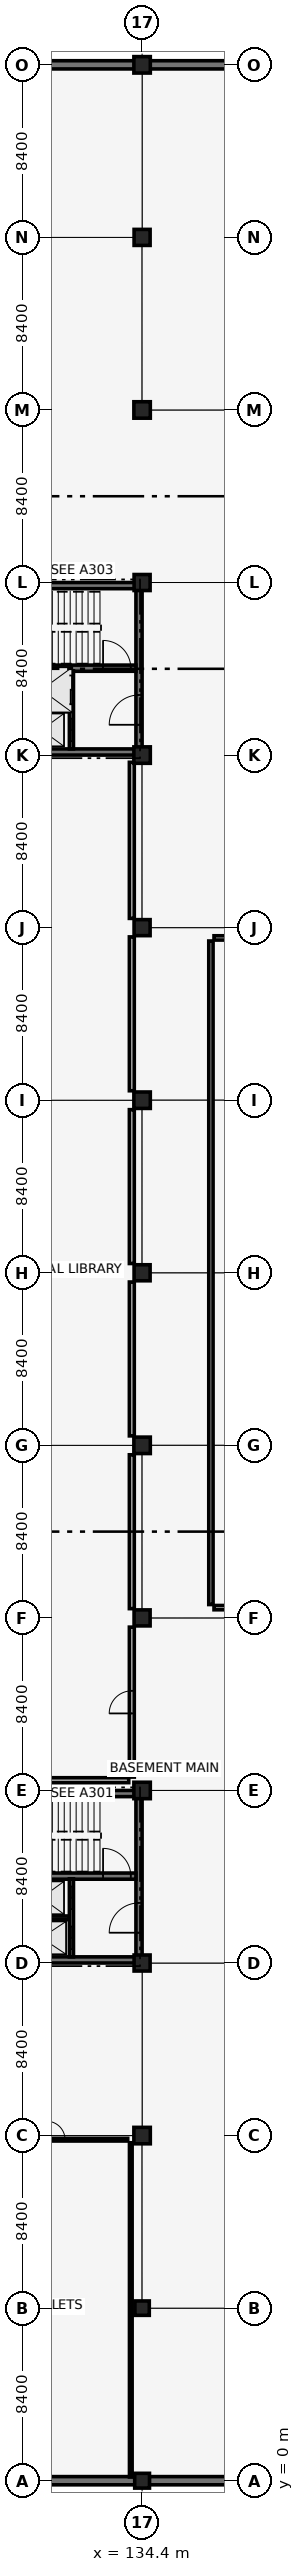
"""IFC4 building model, lengths in metres.
Left out: names, types, materials, properties, quantities, classifications, styles, units other than length and angle.
Written with IfcOpenShell. Run it as: python <this file> out.ifc"""

import sys

from ifc_helpers import new_model, si_unit, direction, frame, frame_2d, origin, origin_2d, place, context, subcontext, project, spatial, rectangle, extrude, element, fill, save


model = new_model("IFC4")
c1 = context("Model", 3, precision=1e-05, world=origin(), true_north=direction((0.0, 1.0)))
c2 = subcontext(c1, "Body", "Model", "MODEL_VIEW")
j1 = project(units=[si_unit("LENGTHUNIT", "METRE"), si_unit("PLANEANGLEUNIT", "RADIAN")], contexts=[c1])
p1 = place(None, origin())
s1 = spatial("IfcSite", under=j1, at=p1, CompositionType="ELEMENT")
p2 = place(p1, origin())
s2 = spatial("IfcBuilding", under=s1, at=p2, CompositionType="ELEMENT")
p3 = place(p2, frame((0.0, 0.0, -4.42)))
s3 = spatial("IfcBuildingStorey", under=s2, at=p3, CompositionType="ELEMENT", Elevation=-4.42)
for number, where, z_axis, x_axis in (
    (1, (126.35, 0.0, 0.0), (0.0, 0.0, 1.0), (1.0, 0.0, 0.0)),
    (2, (126.35, 117.6, 0.0), (0.0, 0.0, 1.0), (1.0, 0.0, 0.0)),
    (3, (134.75, 0.0, 0.0), (0.0, 0.0, 1.0), (1.0, 0.0, 0.0)),
    (4, (134.75, 117.6, 0.0), (0.0, 0.0, 1.0), (1.0, 0.0, 0.0)),
):
    element("IfcWall", number, at=place(p3, frame(where, z_axis=z_axis, x_axis=x_axis)), inside=s3, PredefinedType="USERDEFINED", context=c2, shape_type="SweptSolid", body=[
        extrude(rectangle(XDim=7.7, YDim=0.4, at=frame_2d((3.85, 0.0))), origin(), (0.0, 0.0, 1.0), 4.12),
    ])
p4 = place(p3, frame((126.15, 25.35, 0.0), z_axis=(0.0, 0.0, 1.0), x_axis=(1.0, 0.0, 0.0)))
e5 = element("IfcWall", 5, at=p4, inside=s3, PredefinedType="SHEAR", context=c2, shape_type="SweptSolid", body=[
    extrude(rectangle(XDim=8.1, YDim=0.3, at=frame_2d((4.05, 0.0))), origin(), (0.0, 0.0, 1.0), 4.12),
])
p5 = place(p4, frame((0.485, 0.0, 0.0)))
e6 = element("IfcOpeningElement", 6, at=p5, cuts=e5, PredefinedType="OPENING", context=c2, shape_type="SweptSolid", body=[
    extrude(rectangle(XDim=1.0, YDim=2.15, at=frame_2d((0.5, 1.075))), frame((0.0, 0.16, 0.0), z_axis=(0.0, -1.0, 0.0), x_axis=(1.0, 0.0, 0.0)), (0.0, 0.0, 1.0), 0.32),
])
p6 = place(p3, frame((126.15, 33.45, 0.0), z_axis=(0.0, 0.0, 1.0), x_axis=(1.0, 0.0, 0.0)))
e7 = element("IfcWall", 7, at=p6, inside=s3, PredefinedType="SHEAR", context=c2, shape_type="SweptSolid", body=[
    extrude(rectangle(XDim=8.1, YDim=0.3, at=frame_2d((4.05, 0.0))), origin(), (0.0, 0.0, 1.0), 4.12),
])
p7 = place(p3, frame((134.25, 25.35, 0.0), z_axis=(0.0, 0.0, 1.0), x_axis=(0.0, 1.0, 0.0)))
e8 = element("IfcWall", 8, at=p7, inside=s3, PredefinedType="SHEAR", context=c2, shape_type="SweptSolid", body=[
    extrude(rectangle(XDim=8.1, YDim=0.3, at=frame_2d((4.05, 0.0))), origin(), (0.0, 0.0, 1.0), 4.12),
])
p8 = place(p7, frame((1.325, 0.0, 0.0)))
e9 = element("IfcOpeningElement", 9, at=p8, cuts=e8, PredefinedType="OPENING", context=c2, shape_type="SweptSolid", body=[
    extrude(rectangle(XDim=1.45, YDim=2.15, at=frame_2d((0.725, 1.075))), frame((0.0, 0.16, 0.0), z_axis=(0.0, -1.0, 0.0), x_axis=(1.0, 0.0, 0.0)), (0.0, 0.0, 1.0), 0.32),
])
p9 = place(p3, frame((126.3, 29.43, 0.0), z_axis=(0.0, 0.0, 1.0), x_axis=(1.0, 0.0, 0.0)))
e10 = element("IfcWall", 10, at=p9, inside=s3, PredefinedType="SHEAR", context=c2, shape_type="SweptSolid", body=[
    extrude(rectangle(XDim=7.8, YDim=0.3, at=frame_2d((3.9, 0.0))), origin(), (0.0, 0.0, 1.0), 4.12),
])
p10 = place(p9, frame((6.2, 0.0, 0.0)))
e11 = element("IfcOpeningElement", 11, at=p10, cuts=e10, PredefinedType="OPENING", context=c2, shape_type="SweptSolid", body=[
    extrude(rectangle(XDim=1.35, YDim=2.15, at=frame_2d((0.675, 1.075))), frame((0.0, 0.16, 0.0), z_axis=(0.0, -1.0, 0.0), x_axis=(1.0, 0.0, 0.0)), (0.0, 0.0, 1.0), 0.32),
])
p11 = place(p3, frame((126.15, 84.15, 0.0), z_axis=(0.0, 0.0, 1.0), x_axis=(1.0, 0.0, 0.0)))
e12 = element("IfcWall", 12, at=p11, inside=s3, PredefinedType="SHEAR", context=c2, shape_type="SweptSolid", body=[
    extrude(rectangle(XDim=8.1, YDim=0.3, at=frame_2d((4.05, 0.0))), origin(), (0.0, 0.0, 1.0), 4.12),
])
p12 = place(p11, frame((0.485, 0.0, 0.0)))
e13 = element("IfcOpeningElement", 13, at=p12, cuts=e12, PredefinedType="OPENING", context=c2, shape_type="SweptSolid", body=[
    extrude(rectangle(XDim=1.0, YDim=2.15, at=frame_2d((0.5, 1.075))), frame((0.0, 0.16, 0.0), z_axis=(0.0, -1.0, 0.0), x_axis=(1.0, 0.0, 0.0)), (0.0, 0.0, 1.0), 0.32),
])
p13 = place(p3, frame((126.15, 92.25, 0.0), z_axis=(0.0, 0.0, 1.0), x_axis=(1.0, 0.0, 0.0)))
e14 = element("IfcWall", 14, at=p13, inside=s3, PredefinedType="SHEAR", context=c2, shape_type="SweptSolid", body=[
    extrude(rectangle(XDim=8.1, YDim=0.3, at=frame_2d((4.05, 0.0))), origin(), (0.0, 0.0, 1.0), 4.12),
])
p14 = place(p3, frame((134.25, 84.15, 0.0), z_axis=(0.0, 0.0, 1.0), x_axis=(0.0, 1.0, 0.0)))
e15 = element("IfcWall", 15, at=p14, inside=s3, PredefinedType="SHEAR", context=c2, shape_type="SweptSolid", body=[
    extrude(rectangle(XDim=8.1, YDim=0.3, at=frame_2d((4.05, 0.0))), origin(), (0.0, 0.0, 1.0), 4.12),
])
p15 = place(p14, frame((1.325, 0.0, 0.0)))
e16 = element("IfcOpeningElement", 16, at=p15, cuts=e15, PredefinedType="OPENING", context=c2, shape_type="SweptSolid", body=[
    extrude(rectangle(XDim=1.45, YDim=2.15, at=frame_2d((0.725, 1.075))), frame((0.0, 0.16, 0.0), z_axis=(0.0, -1.0, 0.0), x_axis=(1.0, 0.0, 0.0)), (0.0, 0.0, 1.0), 0.32),
])
p16 = place(p3, frame((126.3, 88.23, 0.0), z_axis=(0.0, 0.0, 1.0), x_axis=(1.0, 0.0, 0.0)))
e17 = element("IfcWall", 17, at=p16, inside=s3, PredefinedType="SHEAR", context=c2, shape_type="SweptSolid", body=[
    extrude(rectangle(XDim=7.8, YDim=0.3, at=frame_2d((3.9, 0.0))), origin(), (0.0, 0.0, 1.0), 4.12),
])
p17 = place(p16, frame((6.2, 0.0, 0.0)))
e18 = element("IfcOpeningElement", 18, at=p17, cuts=e17, PredefinedType="OPENING", context=c2, shape_type="SweptSolid", body=[
    extrude(rectangle(XDim=1.35, YDim=2.15, at=frame_2d((0.675, 1.075))), frame((0.0, 0.16, 0.0), z_axis=(0.0, -1.0, 0.0), x_axis=(1.0, 0.0, 0.0)), (0.0, 0.0, 1.0), 0.32),
])
p18 = place(p3, frame((134.4, 0.0, -0.4), z_axis=(0.0, 0.0, 1.0), x_axis=(1.0, 0.0, 0.0)))
e19 = element("IfcColumn", 19, at=p18, inside=s3, PredefinedType="COLUMN", context=c2, shape_type="SweptSolid", body=[
    extrude(rectangle(XDim=0.72, YDim=0.72, at=origin_2d()), origin(), (0.0, 0.0, 1.0), 4.52),
])
p19 = place(p3, frame((134.4, 8.4, -0.4), z_axis=(0.0, 0.0, 1.0), x_axis=(1.0, 0.0, 0.0)))
e20 = element("IfcColumn", 20, at=p19, inside=s3, PredefinedType="COLUMN", context=c2, shape_type="SweptSolid", body=[
    extrude(rectangle(XDim=0.7, YDim=0.7, at=origin_2d()), origin(), (0.0, 0.0, 1.0), 4.52),
])
p20 = place(p3, frame((134.4, 16.8, -0.4), z_axis=(0.0, 0.0, 1.0), x_axis=(1.0, 0.0, 0.0)))
e21 = element("IfcColumn", 21, at=p20, inside=s3, PredefinedType="COLUMN", context=c2, shape_type="SweptSolid", body=[
    extrude(rectangle(XDim=0.8, YDim=0.8, at=origin_2d()), origin(), (0.0, 0.0, 1.0), 4.52),
])
p21 = place(p3, frame((134.4, 25.2, -0.4), z_axis=(0.0, 0.0, 1.0), x_axis=(1.0, 0.0, 0.0)))
e22 = element("IfcColumn", 22, at=p21, inside=s3, PredefinedType="COLUMN", context=c2, shape_type="SweptSolid", body=[
    extrude(rectangle(XDim=0.78, YDim=0.78, at=origin_2d()), origin(), (0.0, 0.0, 1.0), 4.52),
])
p22 = place(p3, frame((134.4, 33.6, -0.4), z_axis=(0.0, 0.0, 1.0), x_axis=(1.0, 0.0, 0.0)))
e23 = element("IfcColumn", 23, at=p22, inside=s3, PredefinedType="COLUMN", context=c2, shape_type="SweptSolid", body=[
    extrude(rectangle(XDim=0.8, YDim=0.8, at=origin_2d()), origin(), (0.0, 0.0, 1.0), 4.52),
])
p23 = place(p3, frame((134.4, 42.0, -0.4), z_axis=(0.0, 0.0, 1.0), x_axis=(1.0, 0.0, 0.0)))
e24 = element("IfcColumn", 24, at=p23, inside=s3, PredefinedType="COLUMN", context=c2, shape_type="SweptSolid", body=[
    extrude(rectangle(XDim=0.78, YDim=0.78, at=origin_2d()), origin(), (0.0, 0.0, 1.0), 4.52),
])
p24 = place(p3, frame((134.4, 50.4, -0.4), z_axis=(0.0, 0.0, 1.0), x_axis=(1.0, 0.0, 0.0)))
e25 = element("IfcColumn", 25, at=p24, inside=s3, PredefinedType="COLUMN", context=c2, shape_type="SweptSolid", body=[
    extrude(rectangle(XDim=0.8, YDim=0.8, at=origin_2d()), origin(), (0.0, 0.0, 1.0), 4.52),
])
p25 = place(p3, frame((134.4, 58.8, -0.4), z_axis=(0.0, 0.0, 1.0), x_axis=(1.0, 0.0, 0.0)))
e26 = element("IfcColumn", 26, at=p25, inside=s3, PredefinedType="COLUMN", context=c2, shape_type="SweptSolid", body=[
    extrude(rectangle(XDim=0.78, YDim=0.78, at=origin_2d()), origin(), (0.0, 0.0, 1.0), 4.52),
])
p26 = place(p3, frame((134.4, 67.2, -0.4), z_axis=(0.0, 0.0, 1.0), x_axis=(1.0, 0.0, 0.0)))
e27 = element("IfcColumn", 27, at=p26, inside=s3, PredefinedType="COLUMN", context=c2, shape_type="SweptSolid", body=[
    extrude(rectangle(XDim=0.8, YDim=0.8, at=origin_2d()), origin(), (0.0, 0.0, 1.0), 4.52),
])
p27 = place(p3, frame((134.4, 75.6, -0.4), z_axis=(0.0, 0.0, 1.0), x_axis=(1.0, 0.0, 0.0)))
e28 = element("IfcColumn", 28, at=p27, inside=s3, PredefinedType="COLUMN", context=c2, shape_type="SweptSolid", body=[
    extrude(rectangle(XDim=0.78, YDim=0.78, at=origin_2d()), origin(), (0.0, 0.0, 1.0), 4.52),
])
p28 = place(p3, frame((134.4, 84.0, -0.4), z_axis=(0.0, 0.0, 1.0), x_axis=(1.0, 0.0, 0.0)))
e29 = element("IfcColumn", 29, at=p28, inside=s3, PredefinedType="COLUMN", context=c2, shape_type="SweptSolid", body=[
    extrude(rectangle(XDim=0.8, YDim=0.8, at=origin_2d()), origin(), (0.0, 0.0, 1.0), 4.52),
])
p29 = place(p3, frame((134.4, 92.4, -0.4), z_axis=(0.0, 0.0, 1.0), x_axis=(1.0, 0.0, 0.0)))
e30 = element("IfcColumn", 30, at=p29, inside=s3, PredefinedType="COLUMN", context=c2, shape_type="SweptSolid", body=[
    extrude(rectangle(XDim=0.78, YDim=0.78, at=origin_2d()), origin(), (0.0, 0.0, 1.0), 4.52),
])
p30 = place(p3, frame((134.4, 100.8, -0.4), z_axis=(0.0, 0.0, 1.0), x_axis=(1.0, 0.0, 0.0)))
e31 = element("IfcColumn", 31, at=p30, inside=s3, PredefinedType="COLUMN", context=c2, shape_type="SweptSolid", body=[
    extrude(rectangle(XDim=0.8, YDim=0.8, at=origin_2d()), origin(), (0.0, 0.0, 1.0), 4.52),
])
p31 = place(p3, frame((134.4, 109.2, -0.4), z_axis=(0.0, 0.0, 1.0), x_axis=(1.0, 0.0, 0.0)))
e32 = element("IfcColumn", 32, at=p31, inside=s3, PredefinedType="COLUMN", context=c2, shape_type="SweptSolid", body=[
    extrude(rectangle(XDim=0.78, YDim=0.78, at=origin_2d()), origin(), (0.0, 0.0, 1.0), 4.52),
])
p32 = place(p3, frame((134.4, 117.6, -0.4), z_axis=(0.0, 0.0, 1.0), x_axis=(1.0, 0.0, 0.0)))
e33 = element("IfcColumn", 33, at=p32, inside=s3, PredefinedType="COLUMN", context=c2, shape_type="SweptSolid", body=[
    extrude(rectangle(XDim=0.8, YDim=0.8, at=origin_2d()), origin(), (0.0, 0.0, 1.0), 4.52),
])
p33 = place(p3, frame((130.96, 25.5, 0.0), z_axis=(0.0, 0.0, 1.0), x_axis=(0.0, 1.0, 0.0)))
e34 = element("IfcWall", 34, at=p33, inside=s3, PredefinedType="SHEAR", context=c2, shape_type="SweptSolid", body=[
    extrude(rectangle(XDim=3.8, YDim=0.2, at=frame_2d((1.9, 0.0))), origin(), (0.0, 0.0, 1.0), 3.17),
])
p34 = place(p33, frame((0.375, 0.0, 0.0)))
e35 = element("IfcOpeningElement", 35, at=p34, cuts=e34, PredefinedType="OPENING", context=c2, shape_type="SweptSolid", body=[
    extrude(rectangle(XDim=1.1, YDim=2.15, at=frame_2d((0.55, 1.075))), frame((0.0, 0.11, 0.0), z_axis=(0.0, -1.0, 0.0), x_axis=(1.0, 0.0, 0.0)), (0.0, 0.0, 1.0), 0.22),
])
p35 = place(p33, frame((2.325, 0.0, 0.0)))
e36 = element("IfcOpeningElement", 36, at=p35, cuts=e34, PredefinedType="OPENING", context=c2, shape_type="SweptSolid", body=[
    extrude(rectangle(XDim=1.1, YDim=2.15, at=frame_2d((0.55, 1.075))), frame((0.0, 0.11, 0.0), z_axis=(0.0, -1.0, 0.0), x_axis=(1.0, 0.0, 0.0)), (0.0, 0.0, 1.0), 0.22),
])
p36 = place(p3, frame((128.15, 27.4, 0.0), z_axis=(0.0, 0.0, 1.0), x_axis=(1.0, 0.0, 0.0)))
e37 = element("IfcWall", 37, at=p36, inside=s3, PredefinedType="SHEAR", context=c2, shape_type="SweptSolid", body=[
    extrude(rectangle(XDim=2.7, YDim=0.18, at=frame_2d((1.35, 0.0))), origin(), (0.0, 0.0, 1.0), 4.12),
])
p37 = place(p3, frame((130.96, 84.3, 0.0), z_axis=(0.0, 0.0, 1.0), x_axis=(0.0, 1.0, 0.0)))
e38 = element("IfcWall", 38, at=p37, inside=s3, PredefinedType="SHEAR", context=c2, shape_type="SweptSolid", body=[
    extrude(rectangle(XDim=3.8, YDim=0.2, at=frame_2d((1.9, 0.0))), origin(), (0.0, 0.0, 1.0), 3.17),
])
p38 = place(p37, frame((0.375, 0.0, 0.0)))
e39 = element("IfcOpeningElement", 39, at=p38, cuts=e38, PredefinedType="OPENING", context=c2, shape_type="SweptSolid", body=[
    extrude(rectangle(XDim=1.1, YDim=2.15, at=frame_2d((0.55, 1.075))), frame((0.0, 0.11, 0.0), z_axis=(0.0, -1.0, 0.0), x_axis=(1.0, 0.0, 0.0)), (0.0, 0.0, 1.0), 0.22),
])
p39 = place(p37, frame((2.175, 0.0, 0.0)))
e40 = element("IfcOpeningElement", 40, at=p39, cuts=e38, PredefinedType="OPENING", context=c2, shape_type="SweptSolid", body=[
    extrude(rectangle(XDim=1.4, YDim=2.2, at=frame_2d((0.7, 1.1))), frame((0.0, 0.11, 0.0), z_axis=(0.0, -1.0, 0.0), x_axis=(1.0, 0.0, 0.0)), (0.0, 0.0, 1.0), 0.22),
])
p40 = place(p3, frame((128.15, 86.2, 0.0), z_axis=(0.0, 0.0, 1.0), x_axis=(1.0, 0.0, 0.0)))
e41 = element("IfcWall", 41, at=p40, inside=s3, PredefinedType="SHEAR", context=c2, shape_type="SweptSolid", body=[
    extrude(rectangle(XDim=2.7, YDim=0.18, at=frame_2d((1.35, 0.0))), origin(), (0.0, 0.0, 1.0), 4.12),
])
p41 = place(p3, frame((133.9, 34.25, 0.0), z_axis=(0.0, 0.0, 1.0), x_axis=(0.0, 1.0, 0.0)))
e42 = element("IfcWall", 42, at=p41, inside=s3, PredefinedType="PARTITIONING", context=c2, shape_type="SweptSolid", body=[
    extrude(rectangle(XDim=7.3, YDim=0.24, at=frame_2d((3.65, 0.0))), origin(), (0.0, 0.0, 1.0), 3.56),
])
p42 = place(p41, frame((3.1, 0.0, 0.0)))
e43 = element("IfcOpeningElement", 43, at=p42, cuts=e42, PredefinedType="OPENING", context=c2, shape_type="SweptSolid", body=[
    extrude(rectangle(XDim=1.1, YDim=2.15, at=frame_2d((0.55, 1.075))), frame((0.0, 0.13, 0.0), z_axis=(0.0, -1.0, 0.0), x_axis=(1.0, 0.0, 0.0)), (0.0, 0.0, 1.0), 0.26),
])
p43 = place(p3, frame((133.9, 42.45, 0.0), z_axis=(0.0, 0.0, 1.0), x_axis=(0.0, 1.0, 0.0)))
e44 = element("IfcWall", 44, at=p43, inside=s3, PredefinedType="PARTITIONING", context=c2, shape_type="SweptSolid", body=[
    extrude(rectangle(XDim=7.49, YDim=0.24, at=frame_2d((3.745, 0.0))), origin(), (0.0, 0.0, 1.0), 3.57),
])
p44 = place(p3, frame((133.9, 50.86, 0.0), z_axis=(0.0, 0.0, 1.0), x_axis=(0.0, 1.0, 0.0)))
e45 = element("IfcWall", 45, at=p44, inside=s3, PredefinedType="PARTITIONING", context=c2, shape_type="SweptSolid", body=[
    extrude(rectangle(XDim=7.49, YDim=0.24, at=frame_2d((3.745, 0.0))), origin(), (0.0, 0.0, 1.0), 3.56),
])
p45 = place(p3, frame((133.9, 59.25, 0.0), z_axis=(0.0, 0.0, 1.0), x_axis=(0.0, 1.0, 0.0)))
e46 = element("IfcWall", 46, at=p45, inside=s3, PredefinedType="PARTITIONING", context=c2, shape_type="SweptSolid", body=[
    extrude(rectangle(XDim=7.49, YDim=0.24, at=frame_2d((3.745, 0.0))), origin(), (0.0, 0.0, 1.0), 3.57),
])
p46 = place(p3, frame((133.9, 67.66, 0.0), z_axis=(0.0, 0.0, 1.0), x_axis=(0.0, 1.0, 0.0)))
e47 = element("IfcWall", 47, at=p46, inside=s3, PredefinedType="PARTITIONING", context=c2, shape_type="SweptSolid", body=[
    extrude(rectangle(XDim=7.49, YDim=0.24, at=frame_2d((3.745, 0.0))), origin(), (0.0, 0.0, 1.0), 3.56),
])
p47 = place(p3, frame((133.9, 76.05, 0.0), z_axis=(0.0, 0.0, 1.0), x_axis=(0.0, 1.0, 0.0)))
e48 = element("IfcWall", 48, at=p47, inside=s3, PredefinedType="PARTITIONING", context=c2, shape_type="SweptSolid", body=[
    extrude(rectangle(XDim=7.6, YDim=0.24, at=frame_2d((3.8, 0.0))), origin(), (0.0, 0.0, 1.0), 3.17),
])
p48 = place(p3, frame((126.18, 34.1, 0.0), z_axis=(0.0, 0.0, 1.0), x_axis=(1.0, 0.0, 0.0)))
e49 = element("IfcWall", 49, at=p48, inside=s3, PredefinedType="PARTITIONING", context=c2, shape_type="SweptSolid", body=[
    extrude(rectangle(XDim=7.57, YDim=0.24, at=frame_2d((3.785, 0.0))), origin(), (0.0, 0.0, 1.0), 3.35),
])
p49 = place(p3, frame((137.9, 75.1, 0.0), z_axis=(0.0, 0.0, 1.0), x_axis=(1.0, 0.0, 0.0)))
e50 = element("IfcWall", 50, at=p49, inside=s3, PredefinedType="PARTITIONING", context=c2, shape_type="SweptSolid", body=[
    extrude(rectangle(XDim=4.44, YDim=0.21, at=frame_2d((2.22, 0.0))), origin(), (0.0, 0.0, 1.0), 4.12),
])
p50 = place(p49, frame((1.52, 0.0, 0.0)))
e51 = element("IfcOpeningElement", 51, at=p50, cuts=e50, PredefinedType="OPENING", context=c2, shape_type="SweptSolid", body=[
    extrude(rectangle(XDim=1.4, YDim=2.2, at=frame_2d((0.7, 1.1))), frame((0.0, 0.115, 0.0), z_axis=(0.0, -1.0, 0.0), x_axis=(1.0, 0.0, 0.0)), (0.0, 0.0, 1.0), 0.23),
])
p51 = place(p3, frame((137.75, 42.65, 0.0), z_axis=(0.0, 0.0, 1.0), x_axis=(0.0, 1.0, 0.0)))
e52 = element("IfcWall", 52, at=p51, inside=s3, PredefinedType="PARTITIONING", context=c2, shape_type="SweptSolid", body=[
    extrude(rectangle(XDim=32.3, YDim=0.21, at=frame_2d((16.15, 0.0))), origin(), (0.0, 0.0, 1.0), 3.17),
])
p52 = place(p3, frame((137.9, 42.5, 0.0), z_axis=(0.0, 0.0, 1.0), x_axis=(1.0, 0.0, 0.0)))
e53 = element("IfcWall", 53, at=p52, inside=s3, PredefinedType="PARTITIONING", context=c2, shape_type="SweptSolid", body=[
    extrude(rectangle(XDim=4.44, YDim=0.21, at=frame_2d((2.22, 0.0))), origin(), (0.0, 0.0, 1.0), 4.12),
])
p53 = place(p3, frame((126.7, 16.6, 0.0), z_axis=(0.0, 0.0, 1.0), x_axis=(1.0, 0.0, 0.0)))
e54 = element("IfcWall", 54, at=p53, inside=s3, PredefinedType="PARTITIONING", context=c2, shape_type="SweptSolid", body=[
    extrude(rectangle(XDim=7.0, YDim=0.13, at=frame_2d((3.5, 0.0))), origin(), (0.0, 0.0, 1.0), 3.17),
])
p54 = place(p53, frame((3.05, 0.0, 0.0)))
e55 = element("IfcOpeningElement", 55, at=p54, cuts=e54, PredefinedType="OPENING", context=c2, shape_type="SweptSolid", body=[
    extrude(rectangle(XDim=0.9, YDim=2.1, at=frame_2d((0.45, 1.05))), frame((0.0, 0.075, 0.0), z_axis=(0.0, -1.0, 0.0), x_axis=(1.0, 0.0, 0.0)), (0.0, 0.0, 1.0), 0.15),
])
p55 = place(p3, frame((133.85, 0.18, 0.0), z_axis=(0.0, 0.0, 1.0), x_axis=(0.0, 1.0, 0.0)))
e56 = element("IfcWall", 56, at=p55, inside=s3, PredefinedType="PARTITIONING", context=c2, shape_type="SweptSolid", body=[
    extrude(rectangle(XDim=16.27, YDim=0.13, at=frame_2d((8.135, 0.0))), origin(), (0.0, 0.0, 1.0), 3.17),
])
p56 = place(p10, origin())
e57 = element("IfcDoor", 57, at=p56, inside=s3, OperationType="SINGLE_SWING_LEFT", PredefinedType="DOOR", context=c2, shape_type="SweptSolid", body=[
    extrude(rectangle(XDim=1.35, YDim=2.15, at=frame_2d((0.675, 1.075))), frame((0.0, 0.025, 0.0), z_axis=(0.0, -1.0, 0.0), x_axis=(1.0, 0.0, 0.0)), (0.0, 0.0, 1.0), 0.05),
])
fill(e11, e57)
p57 = place(p34, origin())
e58 = element("IfcDoor", 58, at=p57, inside=s3, OperationType="SLIDING_TO_LEFT", PredefinedType="DOOR", context=c2, shape_type="SweptSolid", body=[
    extrude(rectangle(XDim=1.1, YDim=2.15, at=frame_2d((0.55, 1.075))), frame((0.0, 0.025, 0.0), z_axis=(0.0, -1.0, 0.0), x_axis=(1.0, 0.0, 0.0)), (0.0, 0.0, 1.0), 0.05),
])
fill(e35, e58)
p58 = place(p35, origin())
e59 = element("IfcDoor", 59, at=p58, inside=s3, OperationType="SLIDING_TO_LEFT", PredefinedType="DOOR", context=c2, shape_type="SweptSolid", body=[
    extrude(rectangle(XDim=1.1, YDim=2.15, at=frame_2d((0.55, 1.075))), frame((0.0, 0.025, 0.0), z_axis=(0.0, -1.0, 0.0), x_axis=(1.0, 0.0, 0.0)), (0.0, 0.0, 1.0), 0.05),
])
fill(e36, e59)
p59 = place(p8, origin())
e60 = element("IfcDoor", 60, at=p59, inside=s3, OperationType="DOUBLE_DOOR_SINGLE_SWING", PredefinedType="DOOR", context=c2, shape_type="SweptSolid", body=[
    extrude(rectangle(XDim=1.45, YDim=2.15, at=frame_2d((0.725, 1.075))), frame((0.0, 0.025, 0.0), z_axis=(0.0, -1.0, 0.0), x_axis=(1.0, 0.0, 0.0)), (0.0, 0.0, 1.0), 0.05),
])
fill(e9, e60)
p60 = place(p17, origin())
e61 = element("IfcDoor", 61, at=p60, inside=s3, OperationType="SINGLE_SWING_LEFT", PredefinedType="DOOR", context=c2, shape_type="SweptSolid", body=[
    extrude(rectangle(XDim=1.35, YDim=2.15, at=frame_2d((0.675, 1.075))), frame((0.0, 0.025, 0.0), z_axis=(0.0, -1.0, 0.0), x_axis=(1.0, 0.0, 0.0)), (0.0, 0.0, 1.0), 0.05),
])
fill(e18, e61)
p61 = place(p38, origin())
e62 = element("IfcDoor", 62, at=p61, inside=s3, OperationType="SLIDING_TO_LEFT", PredefinedType="DOOR", context=c2, shape_type="SweptSolid", body=[
    extrude(rectangle(XDim=1.1, YDim=2.15, at=frame_2d((0.55, 1.075))), frame((0.0, 0.025, 0.0), z_axis=(0.0, -1.0, 0.0), x_axis=(1.0, 0.0, 0.0)), (0.0, 0.0, 1.0), 0.05),
])
fill(e39, e62)
p62 = place(p39, origin())
e63 = element("IfcDoor", 63, at=p62, inside=s3, OperationType="SLIDING_TO_LEFT", PredefinedType="DOOR", context=c2, shape_type="SweptSolid", body=[
    extrude(rectangle(XDim=1.4, YDim=2.2, at=frame_2d((0.7, 1.1))), frame((0.0, 0.025, 0.0), z_axis=(0.0, -1.0, 0.0), x_axis=(1.0, 0.0, 0.0)), (0.0, 0.0, 1.0), 0.05),
])
fill(e40, e63)
p63 = place(p15, origin())
e64 = element("IfcDoor", 64, at=p63, inside=s3, OperationType="DOUBLE_DOOR_SINGLE_SWING", PredefinedType="DOOR", context=c2, shape_type="SweptSolid", body=[
    extrude(rectangle(XDim=1.45, YDim=2.15, at=frame_2d((0.725, 1.075))), frame((0.0, 0.025, 0.0), z_axis=(0.0, -1.0, 0.0), x_axis=(1.0, 0.0, 0.0)), (0.0, 0.0, 1.0), 0.05),
])
fill(e16, e64)
p64 = place(p42, origin())
e65 = element("IfcDoor", 65, at=p64, inside=s3, OperationType="SINGLE_SWING_LEFT", PredefinedType="DOOR", context=c2, shape_type="SweptSolid", body=[
    extrude(rectangle(XDim=1.1, YDim=2.15, at=frame_2d((0.55, 1.075))), frame((0.0, 0.025, 0.0), z_axis=(0.0, -1.0, 0.0), x_axis=(1.0, 0.0, 0.0)), (0.0, 0.0, 1.0), 0.05),
])
fill(e43, e65)
p65 = place(p54, origin())
e66 = element("IfcDoor", 66, at=p65, inside=s3, OperationType="SINGLE_SWING_LEFT", PredefinedType="DOOR", context=c2, shape_type="SweptSolid", body=[
    extrude(rectangle(XDim=0.9, YDim=2.1, at=frame_2d((0.45, 1.05))), frame((0.0, 0.025, 0.0), z_axis=(0.0, -1.0, 0.0), x_axis=(1.0, 0.0, 0.0)), (0.0, 0.0, 1.0), 0.05),
])
fill(e55, e66)
save(model, sys.argv[1])
